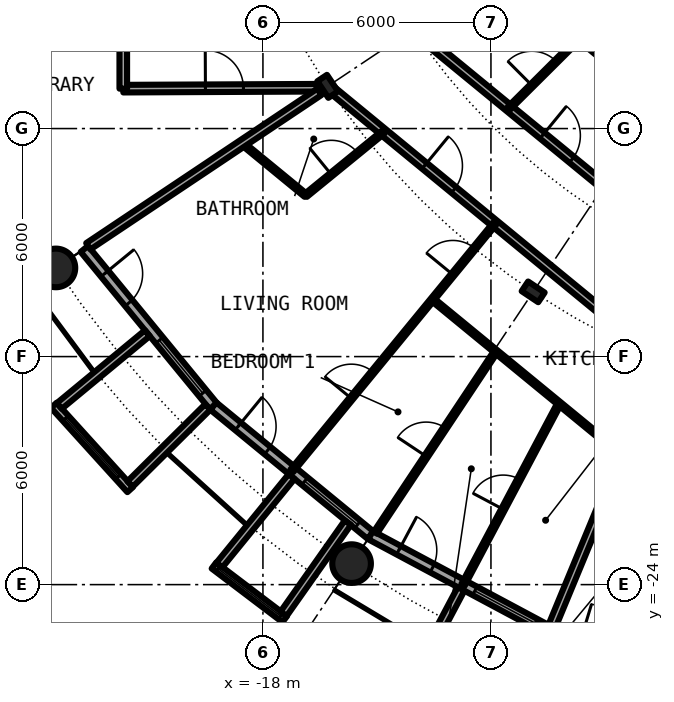
"""IFC4 building model, lengths in metres.
Left out: names, types, materials, properties, quantities, classifications, styles, units other than length and angle.
Written with IfcOpenShell. Run it as: python <this file> out.ifc"""

import sys

from ifc_helpers import new_model, si_unit, direction, frame, frame_2d, origin, origin_2d, place, context, subcontext, project, spatial, rectangle, circle, hollow_circle, i_section, extrude, element, fill, save


model = new_model("IFC4")
c1 = context("Model", 3, precision=1e-05, world=origin(), true_north=direction((0.0, 1.0)))
c2 = subcontext(c1, "Body", "Model", "MODEL_VIEW")
j1 = project(units=[si_unit("LENGTHUNIT", "METRE"), si_unit("PLANEANGLEUNIT", "RADIAN")], contexts=[c1])
p1 = place(None, origin())
s1 = spatial("IfcSite", under=j1, at=p1, CompositionType="ELEMENT")
p2 = place(p1, origin())
s2 = spatial("IfcBuilding", under=s1, at=p2, CompositionType="ELEMENT")
p3 = place(p2, frame((0.0, 0.0, 69.7)))
s3 = spatial("IfcBuildingStorey", under=s2, at=p3, CompositionType="ELEMENT", Elevation=69.7)
for number, where, z_axis, x_axis in (
    (1, (-23.448, -15.667, 0.0), (0.0, 0.0, 1.0), (1.0, 0.0, 0.0)),
    (2, (-15.667, -23.448, 0.0), (0.0, 0.0, 1.0), (1.0, 0.0, 0.0)),
):
    element("IfcColumn", number, at=place(p3, frame(where, z_axis=z_axis, x_axis=x_axis)), inside=s3, PredefinedType="COLUMN", context=c2, shape_type="SweptSolid", body=[
        extrude(hollow_circle(Radius=0.508, WallThickness=0.04, at=origin_2d()), origin(), (0.0, 0.0, 1.0), 3.05),
    ])
for number, where, z_axis, x_axis in (
    (3, (-16.297, -10.889, 0.0), (0.0, 0.0, 1.0), (-0.831, -0.556, 0.0)),
    (4, (-10.889, -16.297, 0.0), (0.0, 0.0, 1.0), (-0.556, -0.831, 0.0)),
):
    element("IfcColumn", number, at=place(p3, frame(where, z_axis=z_axis, x_axis=x_axis)), inside=s3, PredefinedType="COLUMN", context=c2, shape_type="SweptSolid", body=[
        extrude(i_section(OverallWidth=0.306, OverallDepth=0.524, WebThickness=0.021, FlangeThickness=0.04, FilletRadius=0.027, at=origin_2d()), origin(), (0.0, 0.0, 1.0), 3.05),
    ])
p4 = place(p3, frame((-22.699, -15.167, 0.0), z_axis=(0.0, 0.0, 1.0), x_axis=(0.634382322723, -0.773019449054, 0.0)))
e5 = element("IfcWall", 5, at=p4, inside=s3, PredefinedType="SOLIDWALL", context=c2, shape_type="SweptSolid", body=[
    extrude(rectangle(XDim=5.352, YDim=0.25, at=frame_2d((2.676, 0.0))), origin(), (0.0, 0.0, 1.0), 2.7),
])
p5 = place(p4, frame((0.841, 0.0, 0.0)))
e6 = element("IfcOpeningElement", 6, at=p5, cuts=e5, PredefinedType="OPENING", context=c2, shape_type="SweptSolid", body=[
    extrude(rectangle(XDim=1.0, YDim=2.2, at=frame_2d((0.5, 1.1))), frame((0.0, 0.135, 0.0), z_axis=(0.0, -1.0, 0.0), x_axis=(1.0, 0.0, 0.0)), (0.0, 0.0, 1.0), 0.27),
])
p6 = place(p4, frame((3.111, 0.0, 0.3)))
e7 = element("IfcOpeningElement", 7, at=p6, cuts=e5, PredefinedType="OPENING", context=c2, shape_type="SweptSolid", body=[
    extrude(rectangle(XDim=1.8, YDim=2.1, at=frame_2d((0.9, 1.05))), frame((0.0, 0.135, 0.0), z_axis=(0.0, -1.0, 0.0), x_axis=(1.0, 0.0, 0.0)), (0.0, 0.0, 1.0), 0.27),
])
p7 = place(p3, frame((-23.503, -19.282, -0.03), z_axis=(0.0, 0.0, 1.0), x_axis=(0.671506829416, -0.740998365753, 0.0)))
e8 = element("IfcWall", 8, at=p7, inside=s3, PredefinedType="SOLIDWALL", context=c2, shape_type="SweptSolid", body=[
    extrude(rectangle(XDim=2.993, YDim=0.2, at=frame_2d((1.497, 0.0))), origin(), (0.0, 0.0, 1.0), 2.73),
])
p8 = place(p7, frame((0.457, 0.0, 0.33)))
e9 = element("IfcOpeningElement", 9, at=p8, cuts=e8, PredefinedType="OPENING", context=c2, shape_type="SweptSolid", body=[
    extrude(circle(Radius=1.04, at=frame_2d((1.04, 1.04))), frame((0.0, 0.11, 0.0), z_axis=(0.0, -1.0, 0.0), x_axis=(1.0, 0.0, 0.0)), (0.0, 0.0, 1.0), 0.22),
])
p9 = place(p3, frame((-21.041, -17.384, -0.03), z_axis=(0.0, 0.0, 1.0), x_axis=(-0.770784861449, -0.63709551667, 0.0)))
e10 = element("IfcWall", 10, at=p9, inside=s3, PredefinedType="SOLIDWALL", context=c2, shape_type="SweptSolid", body=[
    extrude(rectangle(XDim=3.006, YDim=0.2, at=frame_2d((1.503, 0.0))), origin(), (0.0, 0.0, 1.0), 2.73),
])
p10 = place(p3, frame((-19.45, -19.323, -0.03), z_axis=(0.0, 0.0, 1.0), x_axis=(-0.709727076896, -0.704476739375, 0.0)))
e11 = element("IfcWall", 11, at=p10, inside=s3, PredefinedType="SOLIDWALL", context=c2, shape_type="SweptSolid", body=[
    extrude(rectangle(XDim=2.883, YDim=0.2, at=frame_2d((1.441, 0.0))), origin(), (0.0, 0.0, 1.0), 2.73),
])
p11 = place(p3, frame((-19.304, -19.304, 0.0), z_axis=(0.0, 0.0, 1.0), x_axis=(0.773019449054, -0.634382322723, 0.0)))
e12 = element("IfcWall", 12, at=p11, inside=s3, PredefinedType="SOLIDWALL", context=c2, shape_type="SweptSolid", body=[
    extrude(rectangle(XDim=5.352, YDim=0.25, at=frame_2d((2.676, 0.0))), origin(), (0.0, 0.0, 1.0), 2.7),
])
p12 = place(p11, frame((0.841, 0.0, 0.0)))
e13 = element("IfcOpeningElement", 13, at=p12, cuts=e12, PredefinedType="OPENING", context=c2, shape_type="SweptSolid", body=[
    extrude(rectangle(XDim=1.0, YDim=2.2, at=frame_2d((0.5, 1.1))), frame((0.0, 0.135, 0.0), z_axis=(0.0, -1.0, 0.0), x_axis=(1.0, 0.0, 0.0)), (0.0, 0.0, 1.0), 0.27),
])
p13 = place(p11, frame((3.111, 0.0, 0.3)))
e14 = element("IfcOpeningElement", 14, at=p13, cuts=e12, PredefinedType="OPENING", context=c2, shape_type="SweptSolid", body=[
    extrude(rectangle(XDim=1.8, YDim=2.1, at=frame_2d((0.9, 1.05))), frame((0.0, 0.135, 0.0), z_axis=(0.0, -1.0, 0.0), x_axis=(1.0, 0.0, 0.0)), (0.0, 0.0, 1.0), 0.27),
])
p14 = place(p3, frame((-19.289, -23.497, -0.03), z_axis=(0.0, 0.0, 1.0), x_axis=(0.796842165306, -0.60418752353, 0.0)))
e15 = element("IfcWall", 15, at=p14, inside=s3, PredefinedType="SOLIDWALL", context=c2, shape_type="SweptSolid", body=[
    extrude(rectangle(XDim=2.337, YDim=0.2, at=frame_2d((1.168, 0.0))), origin(), (0.0, 0.0, 1.0), 2.73),
])
p15 = place(p14, frame((0.128, 0.0, 0.33)))
e16 = element("IfcOpeningElement", 16, at=p15, cuts=e15, PredefinedType="OPENING", context=c2, shape_type="SweptSolid", body=[
    extrude(circle(Radius=1.04, at=frame_2d((1.04, 1.04))), frame((0.0, 0.11, 0.0), z_axis=(0.0, -1.0, 0.0), x_axis=(1.0, 0.0, 0.0)), (0.0, 0.0, 1.0), 0.22),
])
p16 = place(p3, frame((-17.246, -21.155, -0.03), z_axis=(0.0, 0.0, 1.0), x_axis=(-0.631741648902, -0.775179004516, 0.0)))
e17 = element("IfcWall", 17, at=p16, inside=s3, PredefinedType="SOLIDWALL", context=c2, shape_type="SweptSolid", body=[
    extrude(rectangle(XDim=3.006, YDim=0.2, at=frame_2d((1.503, 0.0))), origin(), (0.0, 0.0, 1.0), 2.73),
])
p17 = place(p3, frame((-15.765, -22.37, -0.03), z_axis=(0.0, 0.0, 1.0), x_axis=(-0.576274612209, -0.817256123454, 0.0)))
e18 = element("IfcWall", 18, at=p17, inside=s3, PredefinedType="SOLIDWALL", context=c2, shape_type="SweptSolid", body=[
    extrude(rectangle(XDim=2.933, YDim=0.2, at=frame_2d((1.466, 0.0))), origin(), (0.0, 0.0, 1.0), 2.73),
])
p18 = place(p3, frame((-15.167, -22.699, 0.0), z_axis=(0.0, 0.0, 1.0), x_axis=(0.881915646801, -0.471407246368, 0.0)))
e19 = element("IfcWall", 19, at=p18, inside=s3, PredefinedType="SOLIDWALL", context=c2, shape_type="SweptSolid", body=[
    extrude(rectangle(XDim=5.352, YDim=0.25, at=frame_2d((2.676, 0.0))), origin(), (0.0, 0.0, 1.0), 2.7),
])
p19 = place(p18, frame((0.841, 0.0, 0.0)))
e20 = element("IfcOpeningElement", 20, at=p19, cuts=e19, PredefinedType="OPENING", context=c2, shape_type="SweptSolid", body=[
    extrude(rectangle(XDim=1.0, YDim=2.2, at=frame_2d((0.5, 1.1))), frame((0.0, 0.135, 0.0), z_axis=(0.0, -1.0, 0.0), x_axis=(1.0, 0.0, 0.0)), (0.0, 0.0, 1.0), 0.27),
])
p20 = place(p18, frame((3.111, 0.0, 0.3)))
e21 = element("IfcOpeningElement", 21, at=p20, cuts=e19, PredefinedType="OPENING", context=c2, shape_type="SweptSolid", body=[
    extrude(rectangle(XDim=1.8, YDim=2.1, at=frame_2d((0.9, 1.05))), frame((0.0, 0.135, 0.0), z_axis=(0.0, -1.0, 0.0), x_axis=(1.0, 0.0, 0.0)), (0.0, 0.0, 1.0), 0.27),
])
p21 = place(p3, frame((-12.787, -24.113, -0.03), z_axis=(0.0, 0.0, 1.0), x_axis=(-0.468365282436, -0.883534924159, 0.0)))
e22 = element("IfcWall", 22, at=p21, inside=s3, PredefinedType="SOLIDWALL", context=c2, shape_type="SweptSolid", body=[
    extrude(rectangle(XDim=3.006, YDim=0.2, at=frame_2d((1.503, 0.0))), origin(), (0.0, 0.0, 1.0), 2.73),
])
p22 = place(p3, frame((-18.542, -12.389, 0.0), z_axis=(0.0, 0.0, 1.0), x_axis=(0.772948171844, -0.634469166818, 0.0)))
e23 = element("IfcWall", 23, at=p22, inside=s3, PredefinedType="PARTITIONING", context=c2, shape_type="SweptSolid", body=[
    extrude(rectangle(XDim=2.158, YDim=0.1, at=frame_2d((1.079, 0.0))), origin(), (0.0, 0.0, 1.0), 2.7),
])
p23 = place(p3, frame((-13.538, -16.496, 0.0), z_axis=(0.0, 0.0, 1.0), x_axis=(0.773000340237, -0.634405606843, 0.0)))
e24 = element("IfcWall", 24, at=p23, inside=s3, PredefinedType="PARTITIONING", context=c2, shape_type="SweptSolid", body=[
    extrude(rectangle(XDim=6.474, YDim=0.1, at=frame_2d((3.237, 0.0))), origin(), (0.0, 0.0, 1.0), 2.7),
])
p24 = place(p3, frame((-16.172, -10.99, 0.0), z_axis=(0.0, 0.0, 1.0), x_axis=(0.772669779479, -0.634808169355, 0.0)))
e25 = element("IfcWall", 25, at=p24, inside=s3, PredefinedType="PARTITIONING", context=c2, shape_type="SweptSolid", body=[
    extrude(rectangle(XDim=11.208, YDim=0.2, at=frame_2d((5.604, 0.0))), origin(), (0.0, 0.0, 1.0), 2.38),
])
p25 = place(p24, frame((3.135, 0.0, 0.0)))
e26 = element("IfcOpeningElement", 26, at=p25, cuts=e25, PredefinedType="OPENING", context=c2, shape_type="SweptSolid", body=[
    extrude(rectangle(XDim=1.0, YDim=2.3, at=frame_2d((0.5, 1.15))), frame((0.0, 0.11, 0.0), z_axis=(0.0, -1.0, 0.0), x_axis=(1.0, 0.0, 0.0)), (0.0, 0.0, 1.0), 0.22),
])
p26 = place(p3, frame((-14.05, -9.392, 0.0), z_axis=(0.0, 0.0, 1.0), x_axis=(0.773074935257, -0.634314704605, 0.0)))
e27 = element("IfcWall", 27, at=p26, inside=s3, PredefinedType="PARTITIONING", context=c2, shape_type="SweptSolid", body=[
    extrude(rectangle(XDim=9.809, YDim=0.2, at=frame_2d((4.904, 0.0))), origin(), (0.0, 0.0, 1.0), 2.7),
])
p27 = place(p26, frame((4.402, 0.0, 0.0)))
e28 = element("IfcOpeningElement", 28, at=p27, cuts=e27, PredefinedType="OPENING", context=c2, shape_type="SweptSolid", body=[
    extrude(rectangle(XDim=1.0, YDim=2.3, at=frame_2d((0.5, 1.15))), frame((0.0, 0.11, 0.0), z_axis=(0.0, -1.0, 0.0), x_axis=(1.0, 0.0, 0.0)), (0.0, 0.0, 1.0), 0.22),
])
p28 = place(p3, frame((-10.093, -9.296, 0.0), z_axis=(0.0, 0.0, 1.0), x_axis=(0.772957368531, -0.6344579627, 0.0)))
e29 = element("IfcWall", 29, at=p28, inside=s3, PredefinedType="PARTITIONING", context=c2, shape_type="SweptSolid", body=[
    extrude(rectangle(XDim=1.906, YDim=0.1, at=frame_2d((0.953, 0.0))), origin(), (0.0, 0.0, 1.0), 2.7),
])
p29 = place(p3, frame((-21.675, -10.95, 0.0), z_axis=(0.0, 0.0, 1.0), x_axis=(0.999988944514, 0.004702217579, 0.0)))
e30 = element("IfcWall", 30, at=p29, inside=s3, PredefinedType="PARTITIONING", context=c2, shape_type="SweptSolid", body=[
    extrude(rectangle(XDim=5.088, YDim=0.2, at=frame_2d((2.544, 0.0))), origin(), (0.0, 0.0, 1.0), 2.7),
])
p30 = place(p29, frame((2.162, 0.0, 0.0)))
e31 = element("IfcOpeningElement", 31, at=p30, cuts=e30, PredefinedType="OPENING", context=c2, shape_type="SweptSolid", body=[
    extrude(rectangle(XDim=1.0, YDim=2.3, at=frame_2d((0.5, 1.15))), frame((0.0, 0.11, 0.0), z_axis=(0.0, -1.0, 0.0), x_axis=(1.0, 0.0, 0.0)), (0.0, 0.0, 1.0), 0.22),
])
p31 = place(p3, frame((-22.595, -15.097, 0.0), z_axis=(0.0, 0.0, 1.0), x_axis=(0.831505405283, 0.555516661303, 0.0)))
e32 = element("IfcWall", 32, at=p31, inside=s3, PredefinedType="PARTITIONING", context=c2, shape_type="SweptSolid", body=[
    extrude(rectangle(XDim=7.312, YDim=0.2, at=frame_2d((3.656, 0.0))), origin(), (0.0, 0.0, 1.0), 2.7),
])
p32 = place(p3, frame((-17.24, -21.007, 0.0), z_axis=(0.0, 0.0, 1.0), x_axis=(0.634396151441, 0.77300810024, 0.0)))
e33 = element("IfcWall", 33, at=p32, inside=s3, PredefinedType="PARTITIONING", context=c2, shape_type="SweptSolid", body=[
    extrude(rectangle(XDim=8.419, YDim=0.1, at=frame_2d((4.209, 0.0))), origin(), (0.0, 0.0, 1.0), 2.7),
])
p33 = place(p32, frame((6.679, 0.0, 0.0)))
e34 = element("IfcOpeningElement", 34, at=p33, cuts=e33, PredefinedType="OPENING", context=c2, shape_type="SweptSolid", body=[
    extrude(rectangle(XDim=0.9, YDim=2.3, at=frame_2d((0.45, 1.15))), frame((0.0, 0.06, 0.0), z_axis=(0.0, -1.0, 0.0), x_axis=(1.0, 0.0, 0.0)), (0.0, 0.0, 1.0), 0.12),
])
p34 = place(p32, frame((2.468, 0.0, 0.0)))
e35 = element("IfcOpeningElement", 35, at=p34, cuts=e33, PredefinedType="OPENING", context=c2, shape_type="SweptSolid", body=[
    extrude(rectangle(XDim=0.9, YDim=2.3, at=frame_2d((0.45, 1.15))), frame((0.0, 0.06, 0.0), z_axis=(0.0, -1.0, 0.0), x_axis=(1.0, 0.0, 0.0)), (0.0, 0.0, 1.0), 0.12),
])
p35 = place(p3, frame((-16.874, -13.758, 0.0), z_axis=(0.0, 0.0, 1.0), x_axis=(0.774979608522, 0.631986239072, 0.0)))
e36 = element("IfcWall", 36, at=p35, inside=s3, PredefinedType="PARTITIONING", context=c2, shape_type="SweptSolid", body=[
    extrude(rectangle(XDim=2.636, YDim=0.1, at=frame_2d((1.318, 0.0))), origin(), (0.0, 0.0, 1.0), 2.7),
])
p36 = place(p35, frame((0.868, 0.0, 0.0)))
e37 = element("IfcOpeningElement", 37, at=p36, cuts=e36, PredefinedType="OPENING", context=c2, shape_type="SweptSolid", body=[
    extrude(rectangle(XDim=0.9, YDim=2.3, at=frame_2d((0.45, 1.15))), frame((0.0, 0.06, 0.0), z_axis=(0.0, -1.0, 0.0), x_axis=(1.0, 0.0, 0.0)), (0.0, 0.0, 1.0), 0.12),
])
p37 = place(p3, frame((-15.041, -22.632, 0.0), z_axis=(0.0, 0.0, 1.0), x_axis=(0.553637025191, 0.83275809473, 0.0)))
e38 = element("IfcWall", 38, at=p37, inside=s3, PredefinedType="PARTITIONING", context=c2, shape_type="SweptSolid", body=[
    extrude(rectangle(XDim=5.726, YDim=0.1, at=frame_2d((2.863, 0.0))), origin(), (0.0, 0.0, 1.0), 2.7),
])
p38 = place(p37, frame((2.412, 0.0, 0.0)))
e39 = element("IfcOpeningElement", 39, at=p38, cuts=e38, PredefinedType="OPENING", context=c2, shape_type="SweptSolid", body=[
    extrude(rectangle(XDim=0.9, YDim=2.3, at=frame_2d((0.45, 1.15))), frame((0.0, 0.06, 0.0), z_axis=(0.0, -1.0, 0.0), x_axis=(1.0, 0.0, 0.0)), (0.0, 0.0, 1.0), 0.12),
])
p39 = place(p3, frame((-12.734, -24.007, 0.0), z_axis=(0.0, 0.0, 1.0), x_axis=(0.468610030042, 0.883405139075, 0.0)))
e40 = element("IfcWall", 40, at=p39, inside=s3, PredefinedType="PARTITIONING", context=c2, shape_type="SweptSolid", body=[
    extrude(rectangle(XDim=5.403, YDim=0.1, at=frame_2d((2.702, 0.0))), origin(), (0.0, 0.0, 1.0), 2.7),
])
p40 = place(p39, frame((2.252, 0.0, 0.0)))
e41 = element("IfcOpeningElement", 41, at=p40, cuts=e40, PredefinedType="OPENING", context=c2, shape_type="SweptSolid", body=[
    extrude(rectangle(XDim=0.9, YDim=2.3, at=frame_2d((0.45, 1.15))), frame((0.0, 0.06, 0.0), z_axis=(0.0, -1.0, 0.0), x_axis=(1.0, 0.0, 0.0)), (0.0, 0.0, 1.0), 0.12),
])
p41 = place(p3, frame((-11.524, -11.464, 0.0), z_axis=(0.0, 0.0, 1.0), x_axis=(0.708796844581, 0.705412668665, 0.0)))
e42 = element("IfcWall", 42, at=p41, inside=s3, PredefinedType="PARTITIONING", context=c2, shape_type="SweptSolid", body=[
    extrude(rectangle(XDim=2.597, YDim=0.1, at=frame_2d((1.299, 0.0))), origin(), (0.0, 0.0, 1.0), 2.7),
])
p42 = place(p41, frame((0.849, 0.0, 0.0)))
e43 = element("IfcOpeningElement", 43, at=p42, cuts=e42, PredefinedType="OPENING", context=c2, shape_type="SweptSolid", body=[
    extrude(rectangle(XDim=0.9, YDim=2.3, at=frame_2d((0.45, 1.15))), frame((0.0, 0.06, 0.0), z_axis=(0.0, -1.0, 0.0), x_axis=(1.0, 0.0, 0.0)), (0.0, 0.0, 1.0), 0.12),
])
p43 = place(p3, frame((-10.399, -25.106, 0.0), z_axis=(0.0, 0.0, 1.0), x_axis=(0.382600411313, 0.923913916587, 0.0)))
e44 = element("IfcWall", 44, at=p43, inside=s3, PredefinedType="PARTITIONING", context=c2, shape_type="SweptSolid", body=[
    extrude(rectangle(XDim=7.574, YDim=0.2, at=frame_2d((3.787, 0.0))), origin(), (0.0, 0.0, 1.0), 2.7),
])
p44 = place(p3, frame((-21.675, -10.95, 0.0), z_axis=(0.0, 0.0, 1.0), x_axis=(0.0, 1.0, 0.0)))
e45 = element("IfcWall", 45, at=p44, inside=s3, PredefinedType="PARTITIONING", context=c2, shape_type="SweptSolid", body=[
    extrude(rectangle(XDim=1.65, YDim=0.2, at=frame_2d((0.825, 0.0))), origin(), (0.0, 0.0, 1.0), 2.7),
])
p45 = place(p5, origin())
e46 = element("IfcDoor", 46, at=p45, inside=s3, OperationType="SINGLE_SWING_LEFT", PredefinedType="DOOR", context=c2, shape_type="SweptSolid", body=[
    extrude(rectangle(XDim=1.0, YDim=2.2, at=frame_2d((0.5, 1.1))), frame((0.0, 0.025, 0.0), z_axis=(0.0, -1.0, 0.0), x_axis=(1.0, 0.0, 0.0)), (0.0, 0.0, 1.0), 0.05),
])
fill(e6, e46)
p46 = place(p6, origin())
e47 = element("IfcWindow", 47, at=p46, inside=s3, PartitioningType="SINGLE_PANEL", PredefinedType="WINDOW", context=c2, shape_type="SweptSolid", body=[
    extrude(rectangle(XDim=1.8, YDim=2.1, at=frame_2d((0.9, 1.05))), frame((0.0, 0.03, 0.0), z_axis=(0.0, -1.0, 0.0), x_axis=(1.0, 0.0, 0.0)), (0.0, 0.0, 1.0), 0.06),
])
fill(e7, e47)
p47 = place(p8, origin())
e48 = element("IfcWindow", 48, at=p47, inside=s3, PartitioningType="SINGLE_PANEL", PredefinedType="WINDOW", context=c2, shape_type="SweptSolid", body=[
    extrude(circle(Radius=1.04, at=frame_2d((1.04, 1.04))), frame((0.0, 0.03, 0.0), z_axis=(0.0, -1.0, 0.0), x_axis=(1.0, 0.0, 0.0)), (0.0, 0.0, 1.0), 0.06),
])
fill(e9, e48)
p48 = place(p12, origin())
e49 = element("IfcDoor", 49, at=p48, inside=s3, OperationType="SINGLE_SWING_LEFT", PredefinedType="DOOR", context=c2, shape_type="SweptSolid", body=[
    extrude(rectangle(XDim=1.0, YDim=2.2, at=frame_2d((0.5, 1.1))), frame((0.0, 0.025, 0.0), z_axis=(0.0, -1.0, 0.0), x_axis=(1.0, 0.0, 0.0)), (0.0, 0.0, 1.0), 0.05),
])
fill(e13, e49)
p49 = place(p13, origin())
e50 = element("IfcWindow", 50, at=p49, inside=s3, PartitioningType="SINGLE_PANEL", PredefinedType="WINDOW", context=c2, shape_type="SweptSolid", body=[
    extrude(rectangle(XDim=1.8, YDim=2.1, at=frame_2d((0.9, 1.05))), frame((0.0, 0.03, 0.0), z_axis=(0.0, -1.0, 0.0), x_axis=(1.0, 0.0, 0.0)), (0.0, 0.0, 1.0), 0.06),
])
fill(e14, e50)
p50 = place(p15, origin())
e51 = element("IfcWindow", 51, at=p50, inside=s3, PartitioningType="SINGLE_PANEL", PredefinedType="WINDOW", context=c2, shape_type="SweptSolid", body=[
    extrude(circle(Radius=1.04, at=frame_2d((1.04, 1.04))), frame((0.0, 0.03, 0.0), z_axis=(0.0, -1.0, 0.0), x_axis=(1.0, 0.0, 0.0)), (0.0, 0.0, 1.0), 0.06),
])
fill(e16, e51)
p51 = place(p19, origin())
e52 = element("IfcDoor", 52, at=p51, inside=s3, OperationType="SINGLE_SWING_LEFT", PredefinedType="DOOR", context=c2, shape_type="SweptSolid", body=[
    extrude(rectangle(XDim=1.0, YDim=2.2, at=frame_2d((0.5, 1.1))), frame((0.0, 0.025, 0.0), z_axis=(0.0, -1.0, 0.0), x_axis=(1.0, 0.0, 0.0)), (0.0, 0.0, 1.0), 0.05),
])
fill(e20, e52)
p52 = place(p20, origin())
e53 = element("IfcWindow", 53, at=p52, inside=s3, PartitioningType="SINGLE_PANEL", PredefinedType="WINDOW", context=c2, shape_type="SweptSolid", body=[
    extrude(rectangle(XDim=1.8, YDim=2.1, at=frame_2d((0.9, 1.05))), frame((0.0, 0.03, 0.0), z_axis=(0.0, -1.0, 0.0), x_axis=(1.0, 0.0, 0.0)), (0.0, 0.0, 1.0), 0.06),
])
fill(e21, e53)
p53 = place(p25, origin())
e54 = element("IfcDoor", 54, at=p53, inside=s3, OperationType="SINGLE_SWING_LEFT", PredefinedType="DOOR", context=c2, shape_type="SweptSolid", body=[
    extrude(rectangle(XDim=1.0, YDim=2.3, at=frame_2d((0.5, 1.15))), frame((0.0, 0.025, 0.0), z_axis=(0.0, -1.0, 0.0), x_axis=(1.0, 0.0, 0.0)), (0.0, 0.0, 1.0), 0.05),
])
fill(e26, e54)
p54 = place(p36, origin())
e55 = element("IfcDoor", 55, at=p54, inside=s3, OperationType="SINGLE_SWING_LEFT", PredefinedType="DOOR", context=c2, shape_type="SweptSolid", body=[
    extrude(rectangle(XDim=0.9, YDim=2.3, at=frame_2d((0.45, 1.15))), frame((0.0, 0.025, 0.0), z_axis=(0.0, -1.0, 0.0), x_axis=(1.0, 0.0, 0.0)), (0.0, 0.0, 1.0), 0.05),
])
fill(e37, e55)
p55 = place(p33, origin())
e56 = element("IfcDoor", 56, at=p55, inside=s3, OperationType="SINGLE_SWING_RIGHT", PredefinedType="DOOR", context=c2, shape_type="SweptSolid", body=[
    extrude(rectangle(XDim=0.9, YDim=2.3, at=frame_2d((0.45, 1.15))), frame((0.0, 0.025, 0.0), z_axis=(0.0, -1.0, 0.0), x_axis=(1.0, 0.0, 0.0)), (0.0, 0.0, 1.0), 0.05),
])
fill(e34, e56)
p56 = place(p34, origin())
e57 = element("IfcDoor", 57, at=p56, inside=s3, OperationType="SINGLE_SWING_LEFT", PredefinedType="DOOR", context=c2, shape_type="SweptSolid", body=[
    extrude(rectangle(XDim=0.9, YDim=2.3, at=frame_2d((0.45, 1.15))), frame((0.0, 0.025, 0.0), z_axis=(0.0, -1.0, 0.0), x_axis=(1.0, 0.0, 0.0)), (0.0, 0.0, 1.0), 0.05),
])
fill(e35, e57)
p57 = place(p38, origin())
e58 = element("IfcDoor", 58, at=p57, inside=s3, OperationType="SINGLE_SWING_LEFT", PredefinedType="DOOR", context=c2, shape_type="SweptSolid", body=[
    extrude(rectangle(XDim=0.9, YDim=2.3, at=frame_2d((0.45, 1.15))), frame((0.0, 0.025, 0.0), z_axis=(0.0, -1.0, 0.0), x_axis=(1.0, 0.0, 0.0)), (0.0, 0.0, 1.0), 0.05),
])
fill(e39, e58)
p58 = place(p40, origin())
e59 = element("IfcDoor", 59, at=p58, inside=s3, OperationType="SINGLE_SWING_LEFT", PredefinedType="DOOR", context=c2, shape_type="SweptSolid", body=[
    extrude(rectangle(XDim=0.9, YDim=2.3, at=frame_2d((0.45, 1.15))), frame((0.0, 0.025, 0.0), z_axis=(0.0, -1.0, 0.0), x_axis=(1.0, 0.0, 0.0)), (0.0, 0.0, 1.0), 0.05),
])
fill(e41, e59)
p59 = place(p27, origin())
e60 = element("IfcDoor", 60, at=p59, inside=s3, OperationType="SINGLE_SWING_LEFT", PredefinedType="DOOR", context=c2, shape_type="SweptSolid", body=[
    extrude(rectangle(XDim=1.0, YDim=2.3, at=frame_2d((0.5, 1.15))), frame((0.0, 0.025, 0.0), z_axis=(0.0, -1.0, 0.0), x_axis=(1.0, 0.0, 0.0)), (0.0, 0.0, 1.0), 0.05),
])
fill(e28, e60)
p60 = place(p42, origin())
e61 = element("IfcDoor", 61, at=p60, inside=s3, OperationType="SINGLE_SWING_RIGHT", PredefinedType="DOOR", context=c2, shape_type="SweptSolid", body=[
    extrude(rectangle(XDim=0.9, YDim=2.3, at=frame_2d((0.45, 1.15))), frame((0.0, 0.025, 0.0), z_axis=(0.0, -1.0, 0.0), x_axis=(1.0, 0.0, 0.0)), (0.0, 0.0, 1.0), 0.05),
])
fill(e43, e61)
p61 = place(p30, origin())
e62 = element("IfcDoor", 62, at=p61, inside=s3, OperationType="SINGLE_SWING_RIGHT", PredefinedType="DOOR", context=c2, shape_type="SweptSolid", body=[
    extrude(rectangle(XDim=1.0, YDim=2.3, at=frame_2d((0.5, 1.15))), frame((0.0, 0.025, 0.0), z_axis=(0.0, -1.0, 0.0), x_axis=(1.0, 0.0, 0.0)), (0.0, 0.0, 1.0), 0.05),
])
fill(e31, e62)
save(model, sys.argv[1])
